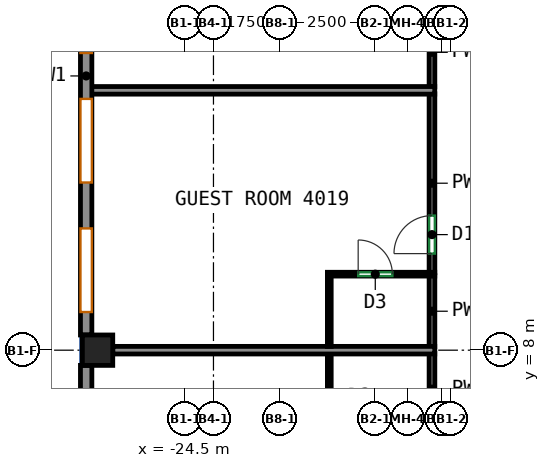
"""IFC4 building model, lengths in metres.
Left out: names, types, materials, properties, quantities, classifications, styles, units other than length and angle.
Written with IfcOpenShell. Run it as: python <this file> out.ifc"""

import sys

from ifc_helpers import new_model, si_unit, direction, frame, frame_2d, origin, origin_2d, place, context, subcontext, project, spatial, rectangle, extrude, source, transform, mapped, element, fill, save


model = new_model("IFC4")
c1 = context("Model", 3, precision=1e-05, world=origin(), true_north=direction((0.0, 1.0)))
c2 = subcontext(c1, "Body", "Model", "MODEL_VIEW")
j1 = project(units=[si_unit("LENGTHUNIT", "METRE"), si_unit("PLANEANGLEUNIT", "RADIAN")], contexts=[c1])
p1 = place(None, origin())
s1 = spatial("IfcSite", under=j1, at=p1, CompositionType="ELEMENT")
p2 = place(p1, origin())
s2 = spatial("IfcBuilding", under=s1, at=p2, CompositionType="ELEMENT")
p3 = place(p2, frame((0.0, 0.0, 171.9)))
s3 = spatial("IfcBuildingStorey", under=s2, at=p3, CompositionType="ELEMENT", Elevation=171.9)
m1 = source(origin(), c2, "Body", "SweptSolid", [
    extrude(rectangle(XDim=0.8, YDim=0.8, at=origin_2d()), origin(), (0.0, 0.0, 1.0), 3.12),
])
p4 = place(p3, frame((-26.8, 8.0, 0.0), z_axis=(0.0, 0.0, 1.0), x_axis=(1.0, 0.0, 0.0)))
e1 = element("IfcColumn", 1, at=p4, inside=s3, PredefinedType="COLUMN", context=c2, shape_type="MappedRepresentation", body=[
    mapped(m1, transform((0.0, 0.0, 0.0))),
])
m2 = source(origin(), c2, "Body", "SweptSolid", [
    extrude(rectangle(XDim=13.632, YDim=0.3, at=frame_2d((6.816, 0.0))), origin(), (0.0, 0.0, 1.0), 3.12),
])
p5 = place(p3, frame((-27.1, 22.032, 0.0), z_axis=(0.0, 0.0, 1.0), x_axis=(0.0, -1.0, 0.0)))
e2 = element("IfcWall", 2, at=p5, inside=s3, PredefinedType="SOLIDWALL", context=c2, shape_type="MappedRepresentation", body=[
    mapped(m2, transform((0.0, 0.0, 0.0))),
])
p6 = place(p5, frame((0.604, 0.0, 0.85)))
e3 = element("IfcOpeningElement", 3, at=p6, cuts=e2, PredefinedType="OPENING", context=c2, shape_type="SweptSolid", body=[
    extrude(rectangle(XDim=2.2, YDim=1.95, at=frame_2d((1.1, 0.975))), frame((0.0, 0.16, 0.0), z_axis=(0.0, -1.0, 0.0), x_axis=(1.0, 0.0, 0.0)), (0.0, 0.0, 1.0), 0.32),
])
p7 = place(p5, frame((4.012, 0.0, 0.85)))
e4 = element("IfcOpeningElement", 4, at=p7, cuts=e2, PredefinedType="OPENING", context=c2, shape_type="SweptSolid", body=[
    extrude(rectangle(XDim=2.2, YDim=1.95, at=frame_2d((1.1, 0.975))), frame((0.0, 0.16, 0.0), z_axis=(0.0, -1.0, 0.0), x_axis=(1.0, 0.0, 0.0)), (0.0, 0.0, 1.0), 0.32),
])
p8 = place(p5, frame((7.42, 0.0, 0.85)))
e5 = element("IfcOpeningElement", 5, at=p8, cuts=e2, PredefinedType="OPENING", context=c2, shape_type="SweptSolid", body=[
    extrude(rectangle(XDim=2.2, YDim=1.95, at=frame_2d((1.1, 0.975))), frame((0.0, 0.16, 0.0), z_axis=(0.0, -1.0, 0.0), x_axis=(1.0, 0.0, 0.0)), (0.0, 0.0, 1.0), 0.32),
])
p9 = place(p5, frame((10.828, 0.0, 0.85)))
e6 = element("IfcOpeningElement", 6, at=p9, cuts=e2, PredefinedType="OPENING", context=c2, shape_type="SweptSolid", body=[
    extrude(rectangle(XDim=2.2, YDim=1.95, at=frame_2d((1.1, 0.975))), frame((0.0, 0.16, 0.0), z_axis=(0.0, -1.0, 0.0), x_axis=(1.0, 0.0, 0.0)), (0.0, 0.0, 1.0), 0.32),
])
m3 = source(origin(), c2, "Body", "SweptSolid", [
    extrude(rectangle(XDim=7.763, YDim=0.3, at=frame_2d((3.881, 0.0))), origin(), (0.0, 0.0, 1.0), 3.12),
])
p10 = place(p3, frame((-27.1, 7.6, 0.0), z_axis=(0.0, 0.0, 1.0), x_axis=(0.0, -1.0, 0.0)))
e7 = element("IfcWall", 7, at=p10, inside=s3, PredefinedType="SOLIDWALL", context=c2, shape_type="MappedRepresentation", body=[
    mapped(m3, transform((0.0, 0.0, 0.0))),
])
p11 = place(p10, frame((0.841, 0.0, 0.85)))
e8 = element("IfcOpeningElement", 8, at=p11, cuts=e7, PredefinedType="OPENING", context=c2, shape_type="SweptSolid", body=[
    extrude(rectangle(XDim=2.2, YDim=1.95, at=frame_2d((1.1, 0.975))), frame((0.0, 0.16, 0.0), z_axis=(0.0, -1.0, 0.0), x_axis=(1.0, 0.0, 0.0)), (0.0, 0.0, 1.0), 0.32),
])
p12 = place(p10, frame((4.722, 0.0, 0.85)))
e9 = element("IfcOpeningElement", 9, at=p12, cuts=e7, PredefinedType="OPENING", context=c2, shape_type="SweptSolid", body=[
    extrude(rectangle(XDim=2.2, YDim=1.95, at=frame_2d((1.1, 0.975))), frame((0.0, 0.16, 0.0), z_axis=(0.0, -1.0, 0.0), x_axis=(1.0, 0.0, 0.0)), (0.0, 0.0, 1.0), 0.32),
])
p13 = place(p3, frame((-18.0, 6.04, 0.0), z_axis=(0.0, 0.0, 1.0), x_axis=(0.0, 1.0, 0.0)))
e10 = element("IfcWall", 10, at=p13, inside=s3, PredefinedType="PARTITIONING", context=c2, shape_type="SweptSolid", body=[
    extrude(rectangle(XDim=1.87, YDim=0.15, at=frame_2d((0.935, 0.0))), origin(), (0.0, 0.0, 1.0), 3.12),
])
p14 = place(p3, frame((-18.0, 10.04, 0.0), z_axis=(0.0, 0.0, 1.0), x_axis=(0.0, 1.0, 0.0)))
e11 = element("IfcWall", 11, at=p14, inside=s3, PredefinedType="PARTITIONING", context=c2, shape_type="SweptSolid", body=[
    extrude(rectangle(XDim=4.707, YDim=0.15, at=frame_2d((2.354, 0.0))), origin(), (0.0, 0.0, 1.0), 3.12),
])
p15 = place(p14, frame((0.501, 0.0, 0.0)))
e12 = element("IfcOpeningElement", 12, at=p15, cuts=e11, PredefinedType="OPENING", context=c2, shape_type="SweptSolid", body=[
    extrude(rectangle(XDim=1.0, YDim=2.1, at=frame_2d((0.5, 1.05))), frame((0.0, 0.085, 0.0), z_axis=(0.0, -1.0, 0.0), x_axis=(1.0, 0.0, 0.0)), (0.0, 0.0, 1.0), 0.17),
])
p16 = place(p3, frame((-18.0, 8.09, 0.0), z_axis=(0.0, 0.0, 1.0), x_axis=(0.0, 1.0, 0.0)))
e13 = element("IfcWall", 13, at=p16, inside=s3, PredefinedType="PARTITIONING", context=c2, shape_type="SweptSolid", body=[
    extrude(rectangle(XDim=1.87, YDim=0.15, at=frame_2d((0.935, 0.0))), origin(), (0.0, 0.0, 1.0), 3.12),
])
p17 = place(p3, frame((-18.0, 14.927, 0.0), z_axis=(0.0, 0.0, 1.0), x_axis=(0.0, 1.0, 0.0)))
e14 = element("IfcWall", 14, at=p17, inside=s3, PredefinedType="PARTITIONING", context=c2, shape_type="SweptSolid", body=[
    extrude(rectangle(XDim=3.033, YDim=0.15, at=frame_2d((1.517, 0.0))), origin(), (0.0, 0.0, 1.0), 3.12),
])
p18 = place(p17, frame((1.425, 0.0, 0.0)))
e15 = element("IfcOpeningElement", 15, at=p18, cuts=e14, PredefinedType="OPENING", context=c2, shape_type="SweptSolid", body=[
    extrude(rectangle(XDim=1.0, YDim=2.1, at=frame_2d((0.5, 1.05))), frame((0.0, 0.085, 0.0), z_axis=(0.0, -1.0, 0.0), x_axis=(1.0, 0.0, 0.0)), (0.0, 0.0, 1.0), 0.17),
])
p19 = place(p3, frame((-20.702, 6.05, 0.0), z_axis=(0.0, 0.0, 1.0), x_axis=(0.0, 1.0, 0.0)))
e16 = element("IfcWall", 16, at=p19, inside=s3, PredefinedType="PARTITIONING", context=c2, shape_type="SweptSolid", body=[
    extrude(rectangle(XDim=1.85, YDim=0.1, at=frame_2d((0.925, 0.0))), origin(), (0.0, 0.0, 1.0), 3.12),
])
p20 = place(p3, frame((-26.4, 8.0, 0.0), z_axis=(0.0, 0.0, 1.0), x_axis=(1.0, 0.0, 0.0)))
e17 = element("IfcWall", 17, at=p20, inside=s3, PredefinedType="PARTITIONING", context=c2, shape_type="SweptSolid", body=[
    extrude(rectangle(XDim=8.473, YDim=0.2, at=frame_2d((4.236, 0.0))), origin(), (0.0, 0.0, 1.0), 3.12),
])
p21 = place(p3, frame((-20.752, 10.0, 0.0), z_axis=(0.0, 0.0, 1.0), x_axis=(1.0, 0.0, 0.0)))
e18 = element("IfcWall", 18, at=p21, inside=s3, PredefinedType="PARTITIONING", context=c2, shape_type="SweptSolid", body=[
    extrude(rectangle(XDim=2.825, YDim=0.1, at=frame_2d((1.413, 0.0))), origin(), (0.0, 0.0, 1.0), 3.12),
])
p22 = place(p21, frame((0.81, 0.0, 0.0)))
e19 = element("IfcOpeningElement", 19, at=p22, cuts=e18, PredefinedType="OPENING", context=c2, shape_type="SweptSolid", body=[
    extrude(rectangle(XDim=0.9, YDim=2.1, at=frame_2d((0.45, 1.05))), frame((0.0, 0.06, 0.0), z_axis=(0.0, -1.0, 0.0), x_axis=(1.0, 0.0, 0.0)), (0.0, 0.0, 1.0), 0.12),
])
p23 = place(p3, frame((-20.702, 8.1, 0.0), z_axis=(0.0, 0.0, 1.0), x_axis=(0.0, 1.0, 0.0)))
e20 = element("IfcWall", 20, at=p23, inside=s3, PredefinedType="PARTITIONING", context=c2, shape_type="SweptSolid", body=[
    extrude(rectangle(XDim=1.85, YDim=0.1, at=frame_2d((0.925, 0.0))), origin(), (0.0, 0.0, 1.0), 3.12),
])
p24 = place(p3, frame((-17.927, 14.837, 0.0), z_axis=(0.0, 0.0, 1.0), x_axis=(-1.0, 0.0, 0.0)))
e21 = element("IfcWall", 21, at=p24, inside=s3, PredefinedType="PARTITIONING", context=c2, shape_type="SweptSolid", body=[
    extrude(rectangle(XDim=9.073, YDim=0.2, at=frame_2d((4.537, 0.0))), origin(), (0.0, 0.0, 1.0), 3.12),
])
p25 = place(p7, origin())
e22 = element("IfcWindow", 22, at=p25, inside=s3, PartitioningType="SINGLE_PANEL", PredefinedType="WINDOW", context=c2, shape_type="SweptSolid", body=[
    extrude(rectangle(XDim=2.2, YDim=1.95, at=frame_2d((1.1, 0.975))), frame((0.0, 0.03, 0.0), z_axis=(0.0, -1.0, 0.0), x_axis=(1.0, 0.0, 0.0)), (0.0, 0.0, 1.0), 0.06),
])
fill(e4, e22)
p26 = place(p8, origin())
e23 = element("IfcWindow", 23, at=p26, inside=s3, PartitioningType="SINGLE_PANEL", PredefinedType="WINDOW", context=c2, shape_type="SweptSolid", body=[
    extrude(rectangle(XDim=2.2, YDim=1.95, at=frame_2d((1.1, 0.975))), frame((0.0, 0.03, 0.0), z_axis=(0.0, -1.0, 0.0), x_axis=(1.0, 0.0, 0.0)), (0.0, 0.0, 1.0), 0.06),
])
fill(e5, e23)
p27 = place(p9, origin())
e24 = element("IfcWindow", 24, at=p27, inside=s3, PartitioningType="SINGLE_PANEL", PredefinedType="WINDOW", context=c2, shape_type="SweptSolid", body=[
    extrude(rectangle(XDim=2.2, YDim=1.95, at=frame_2d((1.1, 0.975))), frame((0.0, 0.03, 0.0), z_axis=(0.0, -1.0, 0.0), x_axis=(1.0, 0.0, 0.0)), (0.0, 0.0, 1.0), 0.06),
])
fill(e6, e24)
p28 = place(p22, origin())
e25 = element("IfcDoor", 25, at=p28, inside=s3, OperationType="SINGLE_SWING_LEFT", PredefinedType="DOOR", context=c2, shape_type="SweptSolid", body=[
    extrude(rectangle(XDim=0.9, YDim=2.1, at=frame_2d((0.45, 1.05))), frame((0.0, 0.025, 0.0), z_axis=(0.0, -1.0, 0.0), x_axis=(1.0, 0.0, 0.0)), (0.0, 0.0, 1.0), 0.05),
])
fill(e19, e25)
p29 = place(p15, origin())
e26 = element("IfcDoor", 26, at=p29, inside=s3, OperationType="SINGLE_SWING_LEFT", PredefinedType="DOOR", context=c2, shape_type="SweptSolid", body=[
    extrude(rectangle(XDim=1.0, YDim=2.1, at=frame_2d((0.5, 1.05))), frame((0.0, 0.025, 0.0), z_axis=(0.0, -1.0, 0.0), x_axis=(1.0, 0.0, 0.0)), (0.0, 0.0, 1.0), 0.05),
])
fill(e12, e26)
save(model, sys.argv[1])
